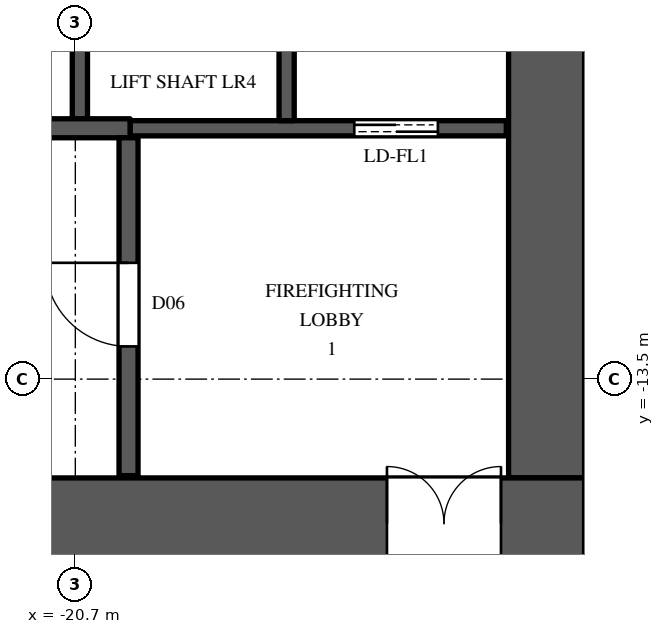
"""IFC4 building model, lengths in metres.
Left out: names, types, materials, properties, quantities, classifications, styles, units other than length and angle.
Written with IfcOpenShell. Run it as: python <this file> out.ifc"""

import sys

from ifc_helpers import new_model, si_unit, direction, frame, frame_2d, origin, place, context, subcontext, project, spatial, rectangle, extrude, element, fill, save


model = new_model("IFC4")
c1 = context("Model", 3, precision=1e-05, world=origin(), true_north=direction((0.0, 1.0)))
c2 = subcontext(c1, "Body", "Model", "MODEL_VIEW")
j1 = project(units=[si_unit("LENGTHUNIT", "METRE"), si_unit("PLANEANGLEUNIT", "RADIAN")], contexts=[c1])
p1 = place(None, origin())
s1 = spatial("IfcSite", under=j1, at=p1, CompositionType="ELEMENT")
p2 = place(p1, origin())
s2 = spatial("IfcBuilding", under=s1, at=p2, CompositionType="ELEMENT")
p3 = place(p2, frame((0.0, 0.0, 59.1)))
s3 = spatial("IfcBuildingStorey", under=s2, at=p3, CompositionType="ELEMENT", Elevation=59.1)
p4 = place(p3, frame((-30.0, -15.4, 0.0), z_axis=(0.0, 0.0, 1.0), x_axis=(1.0, 0.0, 0.0)))
e1 = element("IfcWall", 1, at=p4, inside=s3, PredefinedType="SHEAR", context=c2, shape_type="SweptSolid", body=[
    extrude(rectangle(XDim=16.0, YDim=1.2, at=frame_2d((8.0, 0.0))), origin(), (0.0, 0.0, 1.0), 3.6),
])
p5 = place(p4, frame((13.4, 0.0, 0.0)))
e2 = element("IfcOpeningElement", 2, at=p5, cuts=e1, PredefinedType="OPENING", context=c2, shape_type="SweptSolid", body=[
    extrude(rectangle(XDim=1.5, YDim=2.4, at=frame_2d((0.75, 1.2))), frame((0.0, 0.61, 0.0), z_axis=(0.0, -1.0, 0.0), x_axis=(1.0, 0.0, 0.0)), (0.0, 0.0, 1.0), 1.22),
])
p6 = place(p3, frame((-14.5, -14.8, 0.0), z_axis=(0.0, 0.0, 1.0), x_axis=(0.0, 1.0, 0.0)))
e3 = element("IfcWall", 3, at=p6, inside=s3, PredefinedType="SHEAR", context=c2, shape_type="SweptSolid", body=[
    extrude(rectangle(XDim=29.6, YDim=1.0, at=frame_2d((14.8, 0.0))), origin(), (0.0, 0.0, 1.0), 3.6),
])
p7 = place(p6, frame((8.45, 0.0, 0.0)))
e4 = element("IfcOpeningElement", 4, at=p7, cuts=e3, PredefinedType="OPENING", context=c2, shape_type="SweptSolid", body=[
    extrude(rectangle(XDim=1.5, YDim=2.4, at=frame_2d((0.75, 1.2))), frame((0.0, 0.51, 0.0), z_axis=(0.0, -1.0, 0.0), x_axis=(1.0, 0.0, 0.0)), (0.0, 0.0, 1.0), 1.02),
])
p8 = place(p6, frame((19.65, 0.0, 0.0)))
e5 = element("IfcOpeningElement", 5, at=p8, cuts=e3, PredefinedType="OPENING", context=c2, shape_type="SweptSolid", body=[
    extrude(rectangle(XDim=1.5, YDim=2.4, at=frame_2d((0.75, 1.2))), frame((0.0, 0.51, 0.0), z_axis=(0.0, -1.0, 0.0), x_axis=(1.0, 0.0, 0.0)), (0.0, 0.0, 1.0), 1.02),
])
p9 = place(p6, frame((14.5, 0.0, 0.0)))
e6 = element("IfcOpeningElement", 6, at=p9, cuts=e3, PredefinedType="OPENING", context=c2, shape_type="SweptSolid", body=[
    extrude(rectangle(XDim=0.6, YDim=2.0, at=frame_2d((0.3, 1.0))), frame((0.0, 0.51, 0.0), z_axis=(0.0, -1.0, 0.0), x_axis=(1.0, 0.0, 0.0)), (0.0, 0.0, 1.0), 1.02),
])
p10 = place(p3, frame((-20.64, -10.075, 0.0), z_axis=(0.0, 0.0, 1.0), x_axis=(0.0, 1.0, 0.0)))
e7 = element("IfcWall", 7, at=p10, inside=s3, PredefinedType="SHEAR", context=c2, shape_type="SweptSolid", body=[
    extrude(rectangle(XDim=2.575, YDim=0.2, at=frame_2d((1.288, 0.0))), origin(), (0.0, 0.0, 1.0), 3.6),
])
p11 = place(p3, frame((-19.98, -10.2, 0.0), z_axis=(0.0, 0.0, 1.0), x_axis=(1.0, 0.0, 0.0)))
e8 = element("IfcWall", 8, at=p11, inside=s3, PredefinedType="SHEAR", context=c2, shape_type="SweptSolid", body=[
    extrude(rectangle(XDim=4.95, YDim=0.2, at=frame_2d((2.475, 0.0))), origin(), (0.0, 0.0, 1.0), 3.3),
])
p12 = place(p11, frame((2.95, 0.0, 0.0)))
e9 = element("IfcOpeningElement", 9, at=p12, cuts=e8, PredefinedType="OPENING", context=c2, shape_type="SweptSolid", body=[
    extrude(rectangle(XDim=1.1, YDim=2.2, at=frame_2d((0.55, 1.1))), frame((0.0, 0.11, 0.0), z_axis=(0.0, -1.0, 0.0), x_axis=(1.0, 0.0, 0.0)), (0.0, 0.0, 1.0), 0.22),
])
p13 = place(p3, frame((-17.92, -10.1, 0.0), z_axis=(0.0, 0.0, 1.0), x_axis=(0.0, 1.0, 0.0)))
e10 = element("IfcWall", 10, at=p13, inside=s3, PredefinedType="SHEAR", context=c2, shape_type="SweptSolid", body=[
    extrude(rectangle(XDim=2.6, YDim=0.2, at=frame_2d((1.3, 0.0))), origin(), (0.0, 0.0, 1.0), 3.6),
])
p14 = place(p3, frame((-28.81, -10.2, 0.0), z_axis=(0.0, 0.0, 1.0), x_axis=(1.0, 0.0, 0.0)))
e11 = element("IfcWall", 11, at=p14, inside=s3, PredefinedType="SHEAR", context=c2, shape_type="SweptSolid", body=[
    extrude(rectangle(XDim=8.83, YDim=0.25, at=frame_2d((4.415, 0.0))), origin(), (0.0, 0.0, 1.0), 3.3),
])
p15 = place(p3, frame((-20.0, -14.77, 0.0), z_axis=(0.0, 0.0, 1.0), x_axis=(0.0, 1.0, 0.0)))
e12 = element("IfcWall", 12, at=p15, inside=s3, PredefinedType="SHEAR", context=c2, shape_type="SweptSolid", body=[
    extrude(rectangle(XDim=4.445, YDim=0.25, at=frame_2d((2.223, 0.0))), origin(), (0.0, 0.0, 1.0), 3.3),
])
p16 = place(p15, frame((1.7, 0.0, 0.0)))
e13 = element("IfcOpeningElement", 13, at=p16, cuts=e12, PredefinedType="OPENING", context=c2, shape_type="SweptSolid", body=[
    extrude(rectangle(XDim=1.1, YDim=2.2, at=frame_2d((0.55, 1.1))), frame((0.0, 0.135, 0.0), z_axis=(0.0, -1.0, 0.0), x_axis=(1.0, 0.0, 0.0)), (0.0, 0.0, 1.0), 0.27),
])
p17 = place(p16, origin())
e14 = element("IfcDoor", 14, at=p17, inside=s3, OperationType="SINGLE_SWING_RIGHT", PredefinedType="DOOR", context=c2, shape_type="SweptSolid", body=[
    extrude(rectangle(XDim=1.1, YDim=2.2, at=frame_2d((0.55, 1.1))), frame((0.0, 0.025, 0.0), z_axis=(0.0, -1.0, 0.0), x_axis=(1.0, 0.0, 0.0)), (0.0, 0.0, 1.0), 0.05),
])
fill(e13, e14)
p18 = place(p12, origin())
e15 = element("IfcDoor", 15, at=p18, inside=s3, OperationType="DOUBLE_DOOR_SLIDING", PredefinedType="DOOR", context=c2, shape_type="SweptSolid", body=[
    extrude(rectangle(XDim=1.1, YDim=2.2, at=frame_2d((0.55, 1.1))), frame((0.0, 0.025, 0.0), z_axis=(0.0, -1.0, 0.0), x_axis=(1.0, 0.0, 0.0)), (0.0, 0.0, 1.0), 0.05),
])
fill(e9, e15)
p19 = place(p5, origin())
e16 = element("IfcDoor", 16, at=p19, inside=s3, OperationType="DOUBLE_DOOR_SINGLE_SWING", PredefinedType="DOOR", context=c2, shape_type="SweptSolid", body=[
    extrude(rectangle(XDim=1.5, YDim=2.4, at=frame_2d((0.75, 1.2))), frame((0.0, 0.025, 0.0), z_axis=(0.0, -1.0, 0.0), x_axis=(1.0, 0.0, 0.0)), (0.0, 0.0, 1.0), 0.05),
])
fill(e2, e16)
save(model, sys.argv[1])
